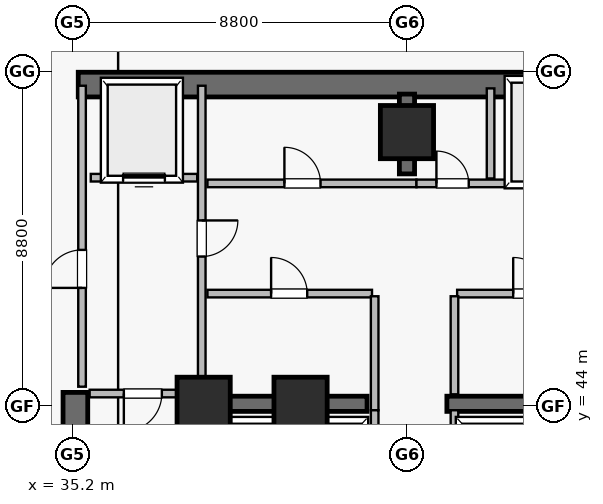
"""IFC4 building model, lengths in metres.
Left out: names, types, materials, properties, quantities, classifications, styles, units other than length and angle.
Written with IfcOpenShell. Run it as: python <this file> out.ifc"""

import sys

from ifc_helpers import new_model, si_unit, direction, frame, frame_2d, origin, origin_2d, place, context, subcontext, project, spatial, rectangle, extrude, element, fill, save


model = new_model("IFC4")
c1 = context("Model", 3, precision=1e-05, world=origin(), true_north=direction((0.0, 1.0)))
c2 = subcontext(c1, "Body", "Model", "MODEL_VIEW")
j1 = project(units=[si_unit("LENGTHUNIT", "METRE"), si_unit("PLANEANGLEUNIT", "RADIAN")], contexts=[c1])
p1 = place(None, origin())
s1 = spatial("IfcSite", under=j1, at=p1, CompositionType="ELEMENT")
p2 = place(p1, origin())
s2 = spatial("IfcBuilding", under=s1, at=p2, CompositionType="ELEMENT")
p3 = place(p2, frame((0.0, 0.0, -15.6)))
s3 = spatial("IfcBuildingStorey", under=s2, at=p3, CompositionType="ELEMENT", Elevation=-15.6)
p4 = place(p3, frame((35.35, 52.45, 0.0), z_axis=(0.0, 0.0, 1.0), x_axis=(1.0, 0.0, 0.0)))
e1 = element("IfcWall", 1, at=p4, inside=s3, PredefinedType="SHEAR", context=c2, shape_type="SweptSolid", body=[
    extrude(rectangle(XDim=17.3, YDim=0.65, at=frame_2d((8.65, 0.0))), origin(), (0.0, 0.0, 1.0), 3.58),
])
p5 = place(p3, frame((35.275, 34.95, 0.0), z_axis=(0.0, 0.0, 1.0), x_axis=(0.0, 1.0, 0.0)))
e2 = element("IfcWall", 2, at=p5, inside=s3, PredefinedType="SHEAR", context=c2, shape_type="SweptSolid", body=[
    extrude(rectangle(XDim=9.4, YDim=0.65, at=frame_2d((4.7, 0.0))), origin(), (0.0, 0.0, 1.0), 3.58),
])
p6 = place(p3, frame((38.775, 35.4, 0.0), z_axis=(0.0, 0.0, 1.0), x_axis=(0.0, 1.0, 0.0)))
e3 = element("IfcWall", 3, at=p6, inside=s3, PredefinedType="SHEAR", context=c2, shape_type="SweptSolid", body=[
    extrude(rectangle(XDim=8.95, YDim=0.65, at=frame_2d((4.475, 0.0))), origin(), (0.0, 0.0, 1.0), 3.58),
])
p7 = place(p3, frame((44.0, 50.1, 0.0), z_axis=(0.0, 0.0, 1.0), x_axis=(0.0, 1.0, 0.0)))
e4 = element("IfcWall", 4, at=p7, inside=s3, PredefinedType="SHEAR", context=c2, shape_type="SweptSolid", body=[
    extrude(rectangle(XDim=2.1, YDim=0.4, at=frame_2d((1.05, 0.0))), origin(), (0.0, 0.0, 1.0), 3.58),
])
for number, where, z_axis, x_axis in (
    (5, (38.75, 44.05, 0.0), (0.0, 0.0, 1.0), (1.0, 0.0, 0.0)),
    (6, (45.05, 44.05, 0.0), (0.0, 0.0, 1.0), (1.0, 0.0, 0.0)),
):
    element("IfcWall", number, at=place(p3, frame(where, z_axis=z_axis, x_axis=x_axis)), inside=s3, PredefinedType="SHEAR", context=c2, shape_type="SweptSolid", body=[
        extrude(rectangle(XDim=4.2, YDim=0.4, at=frame_2d((2.1, 0.0))), origin(), (0.0, 0.0, 1.0), 3.58),
    ])
for number, where, z_axis, x_axis in (
    (7, (38.65, 44.05, 0.0), (0.0, 0.0, 1.0), (1.0, 0.0, 0.0)),
    (8, (44.0, 51.2, 0.0), (0.0, 0.0, 1.0), (1.0, 0.0, 0.0)),
    (9, (41.2, 44.05, 0.0), (0.0, 0.0, 1.0), (1.0, 0.0, 0.0)),
):
    element("IfcColumn", number, at=place(p3, frame(where, z_axis=z_axis, x_axis=x_axis)), inside=s3, PredefinedType="COLUMN", context=c2, shape_type="SweptSolid", body=[
        extrude(rectangle(XDim=1.4, YDim=1.4, at=origin_2d()), origin(), (0.0, 0.0, 1.0), 3.9),
    ])
p8 = place(p3, frame((35.45, 44.5, 0.0), z_axis=(0.0, 0.0, 1.0), x_axis=(0.0, 1.0, 0.0)))
e10 = element("IfcWall", 10, at=p8, inside=s3, PredefinedType="SOLIDWALL", context=c2, shape_type="SweptSolid", body=[
    extrude(rectangle(XDim=7.92, YDim=0.2, at=frame_2d((3.96, 0.0))), origin(), (0.0, 0.0, 1.0), 3.58),
])
p9 = place(p8, frame((2.6, 0.0, 0.0)))
e11 = element("IfcOpeningElement", 11, at=p9, cuts=e10, PredefinedType="OPENING", context=c2, shape_type="SweptSolid", body=[
    extrude(rectangle(XDim=1.0, YDim=2.15, at=frame_2d((0.5, 1.075))), frame((0.0, 0.11, 0.0), z_axis=(0.0, -1.0, 0.0), x_axis=(1.0, 0.0, 0.0)), (0.0, 0.0, 1.0), 0.22),
])
p10 = place(p3, frame((38.6, 44.5, 0.0), z_axis=(0.0, 0.0, 1.0), x_axis=(0.0, 1.0, 0.0)))
e12 = element("IfcWall", 12, at=p10, inside=s3, PredefinedType="SOLIDWALL", context=c2, shape_type="SweptSolid", body=[
    extrude(rectangle(XDim=7.92, YDim=0.2, at=frame_2d((3.96, 0.0))), origin(), (0.0, 0.0, 1.0), 3.58),
])
p11 = place(p10, frame((3.425, 0.0, 0.0)))
e13 = element("IfcOpeningElement", 13, at=p11, cuts=e12, PredefinedType="OPENING", context=c2, shape_type="SweptSolid", body=[
    extrude(rectangle(XDim=0.95, YDim=2.15, at=frame_2d((0.475, 1.075))), frame((0.0, 0.11, 0.0), z_axis=(0.0, -1.0, 0.0), x_axis=(1.0, 0.0, 0.0)), (0.0, 0.0, 1.0), 0.22),
])
p12 = place(p3, frame((38.75, 49.85, 0.0), z_axis=(0.0, 0.0, 1.0), x_axis=(1.0, 0.0, 0.0)))
e14 = element("IfcWall", 14, at=p12, inside=s3, PredefinedType="SOLIDWALL", context=c2, shape_type="SweptSolid", body=[
    extrude(rectangle(XDim=5.5, YDim=0.2, at=frame_2d((2.75, 0.0))), origin(), (0.0, 0.0, 1.0), 3.58),
])
p13 = place(p12, frame((2.025, 0.0, 0.0)))
e15 = element("IfcOpeningElement", 15, at=p13, cuts=e14, PredefinedType="OPENING", context=c2, shape_type="SweptSolid", body=[
    extrude(rectangle(XDim=0.95, YDim=2.15, at=frame_2d((0.475, 1.075))), frame((0.0, 0.11, 0.0), z_axis=(0.0, -1.0, 0.0), x_axis=(1.0, 0.0, 0.0)), (0.0, 0.0, 1.0), 0.22),
])
p14 = place(p3, frame((44.25, 49.85, 0.0), z_axis=(0.0, 0.0, 1.0), x_axis=(1.0, 0.0, 0.0)))
e16 = element("IfcWall", 16, at=p14, inside=s3, PredefinedType="SOLIDWALL", context=c2, shape_type="SweptSolid", body=[
    extrude(rectangle(XDim=5.0, YDim=0.2, at=frame_2d((2.5, 0.0))), origin(), (0.0, 0.0, 1.0), 2.918),
])
p15 = place(p14, frame((0.525, 0.0, 0.0)))
e17 = element("IfcOpeningElement", 17, at=p15, cuts=e16, PredefinedType="OPENING", context=c2, shape_type="SweptSolid", body=[
    extrude(rectangle(XDim=0.85, YDim=2.1, at=frame_2d((0.425, 1.05))), frame((0.0, 0.11, 0.0), z_axis=(0.0, -1.0, 0.0), x_axis=(1.0, 0.0, 0.0)), (0.0, 0.0, 1.0), 0.22),
])
p16 = place(p14, frame((2.95, 0.0, 0.0)))
e18 = element("IfcOpeningElement", 18, at=p16, cuts=e16, PredefinedType="OPENING", context=c2, shape_type="SweptSolid", body=[
    extrude(rectangle(XDim=1.1, YDim=2.15, at=frame_2d((0.55, 1.075))), frame((0.0, 0.11, 0.0), z_axis=(0.0, -1.0, 0.0), x_axis=(1.0, 0.0, 0.0)), (0.0, 0.0, 1.0), 0.22),
])
p17 = place(p3, frame((38.75, 46.95, 0.0), z_axis=(0.0, 0.0, 1.0), x_axis=(1.0, 0.0, 0.0)))
e19 = element("IfcWall", 19, at=p17, inside=s3, PredefinedType="SOLIDWALL", context=c2, shape_type="SweptSolid", body=[
    extrude(rectangle(XDim=4.33, YDim=0.2, at=frame_2d((2.165, 0.0))), origin(), (0.0, 0.0, 1.0), 3.58),
])
p18 = place(p17, frame((1.675, 0.0, 0.0)))
e20 = element("IfcOpeningElement", 20, at=p18, cuts=e19, PredefinedType="OPENING", context=c2, shape_type="SweptSolid", body=[
    extrude(rectangle(XDim=0.95, YDim=2.15, at=frame_2d((0.475, 1.075))), frame((0.0, 0.11, 0.0), z_axis=(0.0, -1.0, 0.0), x_axis=(1.0, 0.0, 0.0)), (0.0, 0.0, 1.0), 0.22),
])
p19 = place(p3, frame((45.32, 46.95, 0.0), z_axis=(0.0, 0.0, 1.0), x_axis=(1.0, 0.0, 0.0)))
e21 = element("IfcWall", 21, at=p19, inside=s3, PredefinedType="SOLIDWALL", context=c2, shape_type="SweptSolid", body=[
    extrude(rectangle(XDim=3.93, YDim=0.2, at=frame_2d((1.965, 0.0))), origin(), (0.0, 0.0, 1.0), 2.918),
])
p20 = place(p19, frame((1.475, 0.0, 0.0)))
e22 = element("IfcOpeningElement", 22, at=p20, cuts=e21, PredefinedType="OPENING", context=c2, shape_type="SweptSolid", body=[
    extrude(rectangle(XDim=0.95, YDim=2.15, at=frame_2d((0.475, 1.075))), frame((0.0, 0.11, 0.0), z_axis=(0.0, -1.0, 0.0), x_axis=(1.0, 0.0, 0.0)), (0.0, 0.0, 1.0), 0.22),
])
p21 = place(p3, frame((35.65, 44.32, 0.0), z_axis=(0.0, 0.0, 1.0), x_axis=(1.0, 0.0, 0.0)))
e23 = element("IfcWall", 23, at=p21, inside=s3, PredefinedType="SOLIDWALL", context=c2, shape_type="SweptSolid", body=[
    extrude(rectangle(XDim=2.8, YDim=0.2, at=frame_2d((1.4, 0.0))), origin(), (0.0, 0.0, 1.0), 3.58),
])
p22 = place(p21, frame((0.9, 0.0, 0.0)))
e24 = element("IfcOpeningElement", 24, at=p22, cuts=e23, PredefinedType="OPENING", context=c2, shape_type="SweptSolid", body=[
    extrude(rectangle(XDim=1.0, YDim=2.15, at=frame_2d((0.5, 1.075))), frame((0.0, 0.11, 0.0), z_axis=(0.0, -1.0, 0.0), x_axis=(1.0, 0.0, 0.0)), (0.0, 0.0, 1.0), 0.22),
])
p23 = place(p3, frame((35.68, 50.0, 0.0), z_axis=(0.0, 0.0, 1.0), x_axis=(1.0, 0.0, 0.0)))
e25 = element("IfcWall", 25, at=p23, inside=s3, PredefinedType="SOLIDWALL", context=c2, shape_type="SweptSolid", body=[
    extrude(rectangle(XDim=2.8, YDim=0.2, at=frame_2d((1.4, 0.0))), origin(), (0.0, 0.0, 1.0), 3.58),
])
p24 = place(p23, frame((0.85, 0.0, 0.0)))
e26 = element("IfcOpeningElement", 26, at=p24, cuts=e25, PredefinedType="OPENING", context=c2, shape_type="SweptSolid", body=[
    extrude(rectangle(XDim=1.1, YDim=2.15, at=frame_2d((0.55, 1.075))), frame((0.0, 0.11, 0.0), z_axis=(0.0, -1.0, 0.0), x_axis=(1.0, 0.0, 0.0)), (0.0, 0.0, 1.0), 0.22),
])
p25 = place(p3, frame((43.15, 43.88, 0.0), z_axis=(0.0, 0.0, 1.0), x_axis=(0.0, 1.0, 0.0)))
e27 = element("IfcWall", 27, at=p25, inside=s3, PredefinedType="SOLIDWALL", context=c2, shape_type="SweptSolid", body=[
    extrude(rectangle(XDim=3.0, YDim=0.2, at=frame_2d((1.5, 0.0))), origin(), (0.0, 0.0, 1.0), 3.58),
])
p26 = place(p3, frame((45.25, 44.3, 0.0), z_axis=(0.0, 0.0, 1.0), x_axis=(0.0, 1.0, 0.0)))
e28 = element("IfcWall", 28, at=p26, inside=s3, PredefinedType="SOLIDWALL", context=c2, shape_type="SweptSolid", body=[
    extrude(rectangle(XDim=2.58, YDim=0.2, at=frame_2d((1.29, 0.0))), origin(), (0.0, 0.0, 1.0), 3.58),
])
for number, where, z_axis, x_axis in (
    (29, (43.15, 41.32, 0.0), (0.0, 0.0, 1.0), (0.0, 1.0, 0.0)),
    (30, (45.25, 41.32, 0.0), (0.0, 0.0, 1.0), (0.0, 1.0, 0.0)),
):
    element("IfcWall", number, at=place(p3, frame(where, z_axis=z_axis, x_axis=x_axis)), inside=s3, PredefinedType="SOLIDWALL", context=c2, shape_type="SweptSolid", body=[
        extrude(rectangle(XDim=2.56, YDim=0.2, at=frame_2d((1.28, 0.0))), origin(), (0.0, 0.0, 1.0), 3.58),
    ])
p27 = place(p3, frame((40.9, 41.32, 0.0), z_axis=(0.0, 0.0, 1.0), x_axis=(0.0, 1.0, 0.0)))
e31 = element("IfcWall", 31, at=p27, inside=s3, PredefinedType="SOLIDWALL", context=c2, shape_type="SweptSolid", body=[
    extrude(rectangle(XDim=2.53, YDim=0.16, at=frame_2d((1.265, 0.0))), origin(), (0.0, 0.0, 1.0), 3.58),
])
p28 = place(p3, frame((46.2, 49.98, 0.0), z_axis=(0.0, 0.0, 1.0), x_axis=(0.0, 1.0, 0.0)))
e32 = element("IfcWall", 32, at=p28, inside=s3, PredefinedType="SOLIDWALL", context=c2, shape_type="SweptSolid", body=[
    extrude(rectangle(XDim=2.37, YDim=0.2, at=frame_2d((1.185, 0.0))), origin(), (0.0, 0.0, 1.0), 3.58),
])
p29 = place(p22, frame((1.0, 0.0, 0.0), z_axis=(0.0, 0.0, 1.0), x_axis=(-1.0, 0.0, 0.0)))
e33 = element("IfcDoor", 33, at=p29, inside=s3, OperationType="SINGLE_SWING_LEFT", PredefinedType="DOOR", context=c2, shape_type="SweptSolid", body=[
    extrude(rectangle(XDim=1.0, YDim=2.15, at=frame_2d((0.5, 1.075))), frame((0.0, 0.025, 0.0), z_axis=(0.0, -1.0, 0.0), x_axis=(1.0, 0.0, 0.0)), (0.0, 0.0, 1.0), 0.05),
])
fill(e24, e33)
p30 = place(p9, origin())
e34 = element("IfcDoor", 34, at=p30, inside=s3, OperationType="SINGLE_SWING_LEFT", PredefinedType="DOOR", context=c2, shape_type="SweptSolid", body=[
    extrude(rectangle(XDim=1.0, YDim=2.15, at=frame_2d((0.5, 1.075))), frame((0.0, 0.025, 0.0), z_axis=(0.0, -1.0, 0.0), x_axis=(1.0, 0.0, 0.0)), (0.0, 0.0, 1.0), 0.05),
])
fill(e11, e34)
p31 = place(p11, frame((0.95, 0.0, 0.0), z_axis=(0.0, 0.0, 1.0), x_axis=(-1.0, 0.0, 0.0)))
e35 = element("IfcDoor", 35, at=p31, inside=s3, OperationType="SINGLE_SWING_RIGHT", PredefinedType="DOOR", context=c2, shape_type="SweptSolid", body=[
    extrude(rectangle(XDim=0.95, YDim=2.15, at=frame_2d((0.475, 1.075))), frame((0.0, 0.025, 0.0), z_axis=(0.0, -1.0, 0.0), x_axis=(1.0, 0.0, 0.0)), (0.0, 0.0, 1.0), 0.05),
])
fill(e13, e35)
p32 = place(p24, origin())
e36 = element("IfcDoor", 36, at=p32, inside=s3, OperationType="SLIDING_TO_LEFT", PredefinedType="DOOR", context=c2, shape_type="SweptSolid", body=[
    extrude(rectangle(XDim=1.1, YDim=2.15, at=frame_2d((0.55, 1.075))), frame((0.0, 0.025, 0.0), z_axis=(0.0, -1.0, 0.0), x_axis=(1.0, 0.0, 0.0)), (0.0, 0.0, 1.0), 0.05),
])
fill(e26, e36)
p33 = place(p13, origin())
e37 = element("IfcDoor", 37, at=p33, inside=s3, OperationType="SINGLE_SWING_LEFT", PredefinedType="DOOR", context=c2, shape_type="SweptSolid", body=[
    extrude(rectangle(XDim=0.95, YDim=2.15, at=frame_2d((0.475, 1.075))), frame((0.0, 0.025, 0.0), z_axis=(0.0, -1.0, 0.0), x_axis=(1.0, 0.0, 0.0)), (0.0, 0.0, 1.0), 0.05),
])
fill(e15, e37)
p34 = place(p15, origin())
e38 = element("IfcDoor", 38, at=p34, inside=s3, OperationType="SINGLE_SWING_LEFT", PredefinedType="DOOR", context=c2, shape_type="SweptSolid", body=[
    extrude(rectangle(XDim=0.85, YDim=2.1, at=frame_2d((0.425, 1.05))), frame((0.0, 0.025, 0.0), z_axis=(0.0, -1.0, 0.0), x_axis=(1.0, 0.0, 0.0)), (0.0, 0.0, 1.0), 0.05),
])
fill(e17, e38)
p35 = place(p18, origin())
e39 = element("IfcDoor", 39, at=p35, inside=s3, OperationType="SINGLE_SWING_LEFT", PredefinedType="DOOR", context=c2, shape_type="SweptSolid", body=[
    extrude(rectangle(XDim=0.95, YDim=2.15, at=frame_2d((0.475, 1.075))), frame((0.0, 0.025, 0.0), z_axis=(0.0, -1.0, 0.0), x_axis=(1.0, 0.0, 0.0)), (0.0, 0.0, 1.0), 0.05),
])
fill(e20, e39)
p36 = place(p20, origin())
e40 = element("IfcDoor", 40, at=p36, inside=s3, OperationType="SINGLE_SWING_LEFT", PredefinedType="DOOR", context=c2, shape_type="SweptSolid", body=[
    extrude(rectangle(XDim=0.95, YDim=2.15, at=frame_2d((0.475, 1.075))), frame((0.0, 0.025, 0.0), z_axis=(0.0, -1.0, 0.0), x_axis=(1.0, 0.0, 0.0)), (0.0, 0.0, 1.0), 0.05),
])
fill(e22, e40)
save(model, sys.argv[1])
